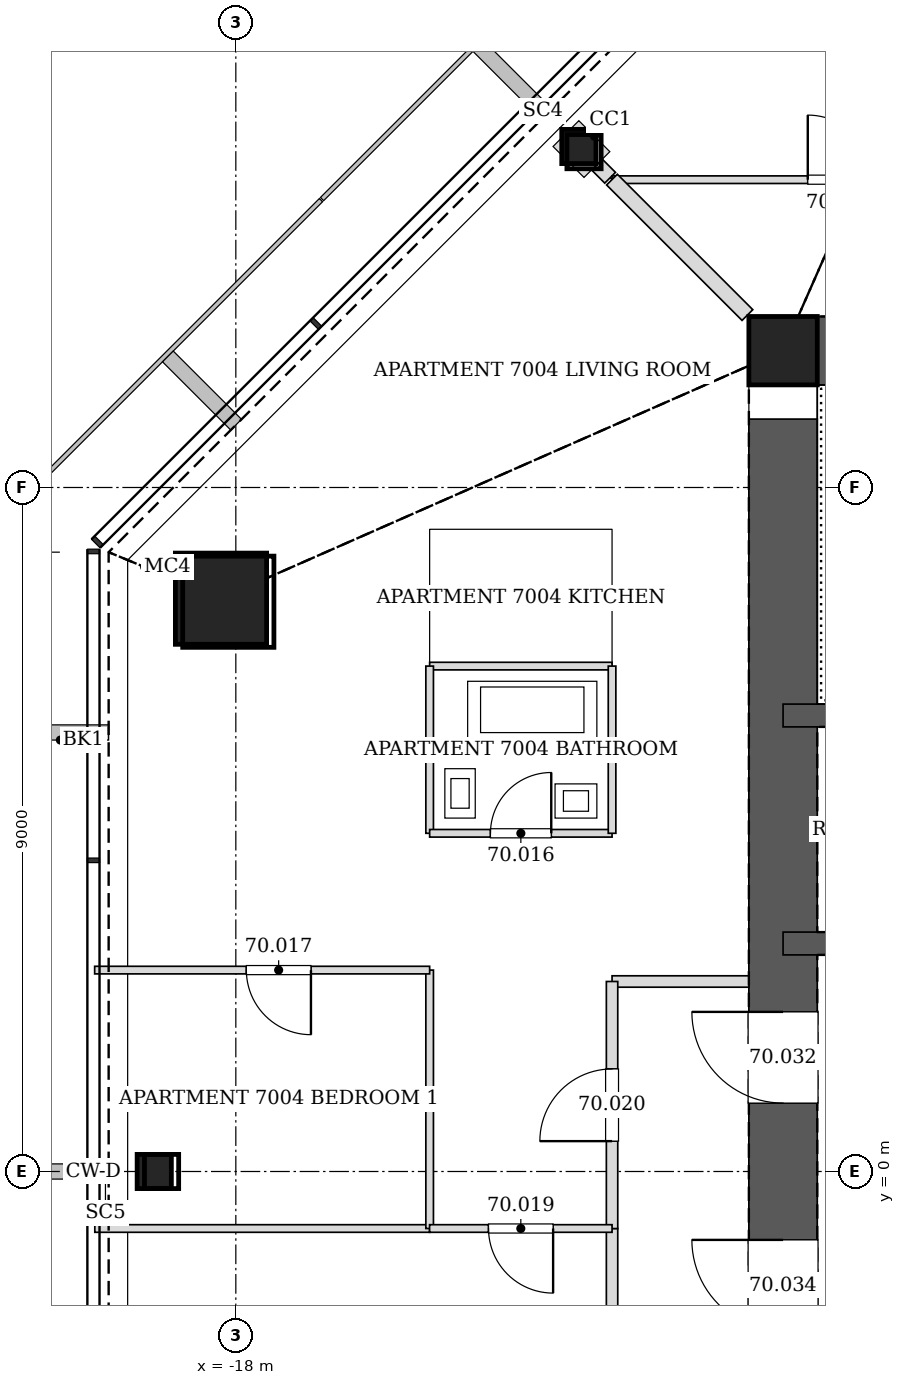
"""IFC4 building model, lengths in metres.
Left out: names, types, materials, properties, quantities, classifications, styles, units other than length and angle.
Written with IfcOpenShell. Run it as: python <this file> out.ifc"""

import sys

from ifc_helpers import new_model, si_unit, direction, frame, frame_2d, origin, origin_2d, place, context, subcontext, project, spatial, rectangle, hollow_rectangle, extrude, element, fill, save


model = new_model("IFC4")
c1 = context("Model", 3, precision=1e-05, world=origin(), true_north=direction((0.0, 1.0)))
c2 = subcontext(c1, "Body", "Model", "MODEL_VIEW")
j1 = project(units=[si_unit("LENGTHUNIT", "METRE"), si_unit("PLANEANGLEUNIT", "RADIAN")], contexts=[c1])
p1 = place(None, origin())
s1 = spatial("IfcSite", under=j1, at=p1, CompositionType="ELEMENT")
p2 = place(p1, origin())
s2 = spatial("IfcBuilding", under=s1, at=p2, CompositionType="ELEMENT")
p3 = place(p2, frame((0.0, 0.0, 287.8)))
s3 = spatial("IfcBuildingStorey", under=s2, at=p3, CompositionType="ELEMENT", Elevation=287.8)
p4 = place(p3, frame((-18.195, 7.537, 0.0), z_axis=(0.02827915051, -0.01169924247, 0.999531598986), x_axis=(0.382282742426, 0.924045401938, 0.0)))
e1 = element("IfcColumn", 1, at=p4, inside=s3, PredefinedType="COLUMN", context=c2, shape_type="SweptSolid", body=[
    extrude(hollow_rectangle(XDim=1.2, YDim=1.2, WallThickness=0.055, at=origin_2d()), origin(), (0.0, 0.0, 1.0), 3.402),
])
for number, where, z_axis, x_axis in (
    (2, (-13.487, 13.487, 0.0), (0.02, -0.02, 1.0), (0.707, 0.707, 0.0)),
    (3, (-19.073, 0.0, 0.0), (0.028, 0.0, 1.0), (0.0, 1.0, 0.0)),
):
    element("IfcColumn", number, at=place(p3, frame(where, z_axis=z_axis, x_axis=x_axis)), inside=s3, PredefinedType="COLUMN", context=c2, shape_type="SweptSolid", body=[
        extrude(hollow_rectangle(XDim=0.45, YDim=0.45, WallThickness=0.02, at=origin_2d()), origin(), (0.0, 0.0, 1.0), 3.401),
    ])
p5 = place(p3, frame((-10.8, 10.8, 0.0), z_axis=(0.0, 0.0, 1.0), x_axis=(1.0, 0.0, 0.0)))
e4 = element("IfcColumn", 4, at=p5, inside=s3, PredefinedType="COLUMN", context=c2, shape_type="SweptSolid", body=[
    extrude(hollow_rectangle(XDim=0.9, YDim=0.9, WallThickness=0.04, at=origin_2d()), origin(), (0.0, 0.0, 1.0), 3.4),
])
p6 = place(p3, frame((10.8, 10.8, 0.0), z_axis=(0.0, 0.0, 1.0), x_axis=(-1.0, 0.0, 0.0)))
e5 = element("IfcWall", 5, at=p6, inside=s3, PredefinedType="SOLIDWALL", context=c2, shape_type="SweptSolid", body=[
    extrude(rectangle(XDim=21.6, YDim=0.9, at=frame_2d((10.8, 0.0))), origin(), (0.0, 0.0, 1.0), 3.4),
])
p7 = place(p6, frame((10.05, 0.0, 0.0)))
e6 = element("IfcOpeningElement", 6, at=p7, cuts=e5, PredefinedType="OPENING", context=c2, shape_type="SweptSolid", body=[
    extrude(rectangle(XDim=1.5, YDim=2.1, at=frame_2d((0.75, 1.05))), frame((0.0, 0.46, 0.0), z_axis=(0.0, -1.0, 0.0), x_axis=(1.0, 0.0, 0.0)), (0.0, 0.0, 1.0), 0.92),
])
p8 = place(p3, frame((-10.8, 10.8, 0.0), z_axis=(0.0, 0.0, 1.0), x_axis=(0.0, -1.0, 0.0)))
e7 = element("IfcWall", 7, at=p8, inside=s3, PredefinedType="SOLIDWALL", context=c2, shape_type="SweptSolid", body=[
    extrude(rectangle(XDim=21.6, YDim=0.9, at=frame_2d((10.8, 0.0))), origin(), (0.0, 0.0, 1.0), 3.4),
])
p9 = place(p8, frame((8.7, 0.0, 0.0)))
e8 = element("IfcOpeningElement", 8, at=p9, cuts=e7, PredefinedType="OPENING", context=c2, shape_type="SweptSolid", body=[
    extrude(rectangle(XDim=1.2, YDim=2.1, at=frame_2d((0.6, 1.05))), frame((0.0, 0.46, 0.0), z_axis=(0.0, -1.0, 0.0), x_axis=(1.0, 0.0, 0.0)), (0.0, 0.0, 1.0), 0.92),
])
p10 = place(p8, frame((11.7, 0.0, 0.0)))
e9 = element("IfcOpeningElement", 9, at=p10, cuts=e7, PredefinedType="OPENING", context=c2, shape_type="SweptSolid", body=[
    extrude(rectangle(XDim=1.2, YDim=2.1, at=frame_2d((0.6, 1.05))), frame((0.0, 0.46, 0.0), z_axis=(0.0, -1.0, 0.0), x_axis=(1.0, 0.0, 0.0)), (0.0, 0.0, 1.0), 0.92),
])
p11 = place(p3, frame((-10.8, 3.0, 0.0), z_axis=(0.0, 0.0, 1.0), x_axis=(1.0, 0.0, 0.0)))
e10 = element("IfcWall", 10, at=p11, inside=s3, PredefinedType="SOLIDWALL", context=c2, shape_type="SweptSolid", body=[
    extrude(rectangle(XDim=21.6, YDim=0.3, at=frame_2d((10.8, 0.0))), origin(), (0.0, 0.0, 1.0), 3.4),
])
p12 = place(p11, frame((1.65, 0.0, 0.0)))
e11 = element("IfcOpeningElement", 11, at=p12, cuts=e10, PredefinedType="OPENING", context=c2, shape_type="SweptSolid", body=[
    extrude(rectangle(XDim=0.9, YDim=2.1, at=frame_2d((0.45, 1.05))), frame((0.0, 0.16, 0.0), z_axis=(0.0, -1.0, 0.0), x_axis=(1.0, 0.0, 0.0)), (0.0, 0.0, 1.0), 0.32),
])
p13 = place(p11, frame((7.45, 0.0, 0.0)))
e12 = element("IfcOpeningElement", 12, at=p13, cuts=e10, PredefinedType="OPENING", context=c2, shape_type="SweptSolid", body=[
    extrude(rectangle(XDim=0.9, YDim=2.1, at=frame_2d((0.45, 1.05))), frame((0.0, 0.16, 0.0), z_axis=(0.0, -1.0, 0.0), x_axis=(1.0, 0.0, 0.0)), (0.0, 0.0, 1.0), 0.32),
])
p14 = place(p11, frame((13.25, 0.0, 0.0)))
e13 = element("IfcOpeningElement", 13, at=p14, cuts=e10, PredefinedType="OPENING", context=c2, shape_type="SweptSolid", body=[
    extrude(rectangle(XDim=0.9, YDim=2.1, at=frame_2d((0.45, 1.05))), frame((0.0, 0.16, 0.0), z_axis=(0.0, -1.0, 0.0), x_axis=(1.0, 0.0, 0.0)), (0.0, 0.0, 1.0), 0.32),
])
p15 = place(p11, frame((16.15, 0.0, 0.0)))
e14 = element("IfcOpeningElement", 14, at=p15, cuts=e10, PredefinedType="OPENING", context=c2, shape_type="SweptSolid", body=[
    extrude(rectangle(XDim=0.9, YDim=2.1, at=frame_2d((0.45, 1.05))), frame((0.0, 0.16, 0.0), z_axis=(0.0, -1.0, 0.0), x_axis=(1.0, 0.0, 0.0)), (0.0, 0.0, 1.0), 0.32),
])
p16 = place(p11, frame((19.05, 0.0, 0.0)))
e15 = element("IfcOpeningElement", 15, at=p16, cuts=e10, PredefinedType="OPENING", context=c2, shape_type="SweptSolid", body=[
    extrude(rectangle(XDim=0.9, YDim=2.1, at=frame_2d((0.45, 1.05))), frame((0.0, 0.16, 0.0), z_axis=(0.0, -1.0, 0.0), x_axis=(1.0, 0.0, 0.0)), (0.0, 0.0, 1.0), 0.32),
])
p17 = place(p11, frame((4.55, 0.0, 0.0)))
e16 = element("IfcOpeningElement", 16, at=p17, cuts=e10, PredefinedType="OPENING", context=c2, shape_type="SweptSolid", body=[
    extrude(rectangle(XDim=0.9, YDim=2.1, at=frame_2d((0.45, 1.05))), frame((0.0, 0.16, 0.0), z_axis=(0.0, -1.0, 0.0), x_axis=(1.0, 0.0, 0.0)), (0.0, 0.0, 1.0), 0.32),
])
p18 = place(p3, frame((-10.8, 6.0, 0.0), z_axis=(0.0, 0.0, 1.0), x_axis=(1.0, 0.0, 0.0)))
e17 = element("IfcWall", 17, at=p18, inside=s3, PredefinedType="SOLIDWALL", context=c2, shape_type="SweptSolid", body=[
    extrude(rectangle(XDim=21.6, YDim=0.3, at=frame_2d((10.8, 0.0))), origin(), (0.0, 0.0, 1.0), 3.4),
])
p19 = place(p18, frame((10.25, 0.0, 0.0)))
e18 = element("IfcOpeningElement", 18, at=p19, cuts=e17, PredefinedType="OPENING", context=c2, shape_type="SweptSolid", body=[
    extrude(rectangle(XDim=1.1, YDim=2.1, at=frame_2d((0.55, 1.05))), frame((0.0, 0.16, 0.0), z_axis=(0.0, -1.0, 0.0), x_axis=(1.0, 0.0, 0.0)), (0.0, 0.0, 1.0), 0.32),
])
p20 = place(p3, frame((-13.05, -0.749, 0.0), z_axis=(0.0, 0.0, 1.0), x_axis=(0.0, -1.0, 0.0)))
e19 = element("IfcWall", 19, at=p20, inside=s3, PredefinedType="PARTITIONING", context=c2, shape_type="SweptSolid", body=[
    extrude(rectangle(XDim=1.502, YDim=0.15, at=frame_2d((0.751, 0.0))), origin(), (0.0, 0.0, 1.0), 3.2),
])
p21 = place(p3, frame((-11.25, 2.5, 0.0), z_axis=(0.0, 0.0, 1.0), x_axis=(-1.0, 0.0, 0.0)))
e20 = element("IfcWall", 20, at=p21, inside=s3, PredefinedType="PARTITIONING", context=c2, shape_type="SweptSolid", body=[
    extrude(rectangle(XDim=1.8, YDim=0.15, at=frame_2d((0.9, 0.0))), origin(), (0.0, 0.0, 1.0), 3.2),
])
p22 = place(p3, frame((-13.05, 2.5, 0.0), z_axis=(0.0, 0.0, 1.0), x_axis=(0.0, -1.0, 0.0)))
e21 = element("IfcWall", 21, at=p22, inside=s3, PredefinedType="PARTITIONING", context=c2, shape_type="SweptSolid", body=[
    extrude(rectangle(XDim=3.251, YDim=0.15, at=frame_2d((1.625, 0.0))), origin(), (0.0, 0.0, 1.0), 2.349),
])
p23 = place(p22, frame((1.15, 0.0, 0.0)))
e22 = element("IfcOpeningElement", 22, at=p23, cuts=e21, PredefinedType="OPENING", context=c2, shape_type="SweptSolid", body=[
    extrude(rectangle(XDim=0.95, YDim=2.1, at=frame_2d((0.475, 1.05))), frame((0.0, 0.085, 0.0), z_axis=(0.0, -1.0, 0.0), x_axis=(1.0, 0.0, 0.0)), (0.0, 0.0, 1.0), 0.17),
])
p24 = place(p3, frame((-13.246, 13.246, 0.0), z_axis=(0.0, 0.0, 1.0), x_axis=(0.707106781187, -0.707106781187, 0.0)))
e23 = element("IfcWall", 23, at=p24, inside=s3, PredefinedType="PARTITIONING", context=c2, shape_type="SweptSolid", body=[
    extrude(rectangle(XDim=0.241, YDim=0.2, at=frame_2d((0.121, 0.0))), origin(), (0.0, 0.0, 1.0), 2.591),
])
p25 = place(p3, frame((-13.05, 13.05, 0.0), z_axis=(0.0, 0.0, 1.0), x_axis=(1.0, 0.0, 0.0)))
e24 = element("IfcWall", 24, at=p25, inside=s3, PredefinedType="PARTITIONING", context=c2, shape_type="SweptSolid", body=[
    extrude(rectangle(XDim=6.0, YDim=0.1, at=frame_2d((3.0, 0.0))), origin(), (0.0, 0.0, 1.0), 2.497),
])
p26 = place(p25, frame((2.575, 0.0, 0.0)))
e25 = element("IfcOpeningElement", 25, at=p26, cuts=e24, PredefinedType="OPENING", context=c2, shape_type="SweptSolid", body=[
    extrude(rectangle(XDim=0.85, YDim=2.1, at=frame_2d((0.425, 1.05))), frame((0.0, 0.06, 0.0), z_axis=(0.0, -1.0, 0.0), x_axis=(1.0, 0.0, 0.0)), (0.0, 0.0, 1.0), 0.12),
])
p27 = place(p3, frame((-15.45, 6.65, 0.0), z_axis=(0.0, 0.0, 1.0), x_axis=(1.0, 0.0, 0.0)))
e26 = element("IfcWall", 26, at=p27, inside=s3, PredefinedType="PARTITIONING", context=c2, shape_type="SweptSolid", body=[
    extrude(rectangle(XDim=2.4, YDim=0.1, at=frame_2d((1.2, 0.0))), origin(), (0.0, 0.0, 1.0), 2.591),
])
p28 = place(p3, frame((-15.45, 6.65, 0.0), z_axis=(0.0, 0.0, 1.0), x_axis=(0.0, -1.0, 0.0)))
e27 = element("IfcWall", 27, at=p28, inside=s3, PredefinedType="PARTITIONING", context=c2, shape_type="SweptSolid", body=[
    extrude(rectangle(XDim=2.2, YDim=0.1, at=frame_2d((1.1, 0.0))), origin(), (0.0, 0.0, 1.0), 3.2),
])
p29 = place(p3, frame((-15.45, 4.45, 0.0), z_axis=(0.0, 0.0, 1.0), x_axis=(1.0, 0.0, 0.0)))
e28 = element("IfcWall", 28, at=p29, inside=s3, PredefinedType="PARTITIONING", context=c2, shape_type="SweptSolid", body=[
    extrude(rectangle(XDim=2.4, YDim=0.1, at=frame_2d((1.2, 0.0))), origin(), (0.0, 0.0, 1.0), 2.591),
])
p30 = place(p29, frame((0.8, 0.0, 0.0)))
e29 = element("IfcOpeningElement", 29, at=p30, cuts=e28, PredefinedType="OPENING", context=c2, shape_type="SweptSolid", body=[
    extrude(rectangle(XDim=0.8, YDim=2.1, at=frame_2d((0.4, 1.05))), frame((0.0, 0.06, 0.0), z_axis=(0.0, -1.0, 0.0), x_axis=(1.0, 0.0, 0.0)), (0.0, 0.0, 1.0), 0.12),
])
p31 = place(p3, frame((-13.05, 4.45, 0.0), z_axis=(0.0, 0.0, 1.0), x_axis=(0.0, 1.0, 0.0)))
e30 = element("IfcWall", 30, at=p31, inside=s3, PredefinedType="PARTITIONING", context=c2, shape_type="SweptSolid", body=[
    extrude(rectangle(XDim=2.2, YDim=0.1, at=frame_2d((1.1, 0.0))), origin(), (0.0, 0.0, 1.0), 3.2),
])
p32 = place(p3, frame((-19.855, -0.75, 0.0), z_axis=(0.0, 0.0, 1.0), x_axis=(1.0, 0.0, 0.0)))
e31 = element("IfcWall", 31, at=p32, inside=s3, PredefinedType="PARTITIONING", context=c2, shape_type="SweptSolid", body=[
    extrude(rectangle(XDim=4.405, YDim=0.1, at=frame_2d((2.203, 0.0))), origin(), (0.0, 0.0, 1.0), 2.73),
])
p33 = place(p3, frame((-15.45, -0.75, 0.0), z_axis=(0.0, 0.0, 1.0), x_axis=(0.0, 1.0, 0.0)))
e32 = element("IfcWall", 32, at=p33, inside=s3, PredefinedType="PARTITIONING", context=c2, shape_type="SweptSolid", body=[
    extrude(rectangle(XDim=3.4, YDim=0.1, at=frame_2d((1.7, 0.0))), origin(), (0.0, 0.0, 1.0), 2.349),
])
p34 = place(p3, frame((-15.45, 2.65, 0.0), z_axis=(0.0, 0.0, 1.0), x_axis=(-1.0, 0.0, 0.0)))
e33 = element("IfcWall", 33, at=p34, inside=s3, PredefinedType="PARTITIONING", context=c2, shape_type="SweptSolid", body=[
    extrude(rectangle(XDim=4.407, YDim=0.1, at=frame_2d((2.204, 0.0))), origin(), (0.0, 0.0, 1.0), 2.73),
])
p35 = place(p34, frame((1.562, 0.0, 0.0)))
e34 = element("IfcOpeningElement", 34, at=p35, cuts=e33, PredefinedType="OPENING", context=c2, shape_type="SweptSolid", body=[
    extrude(rectangle(XDim=0.85, YDim=2.1, at=frame_2d((0.425, 1.05))), frame((0.0, 0.06, 0.0), z_axis=(0.0, -1.0, 0.0), x_axis=(1.0, 0.0, 0.0)), (0.0, 0.0, 1.0), 0.12),
])
p36 = place(p3, frame((-13.05, -0.75, 0.0), z_axis=(0.0, 0.0, 1.0), x_axis=(-1.0, 0.0, 0.0)))
e35 = element("IfcWall", 35, at=p36, inside=s3, PredefinedType="PARTITIONING", context=c2, shape_type="SweptSolid", body=[
    extrude(rectangle(XDim=2.401, YDim=0.1, at=frame_2d((1.2, 0.0))), origin(), (0.0, 0.0, 1.0), 2.591),
])
p37 = place(p36, frame((0.775, 0.0, 0.0)))
e36 = element("IfcOpeningElement", 36, at=p37, cuts=e35, PredefinedType="OPENING", context=c2, shape_type="SweptSolid", body=[
    extrude(rectangle(XDim=0.85, YDim=2.1, at=frame_2d((0.425, 1.05))), frame((0.0, 0.06, 0.0), z_axis=(0.0, -1.0, 0.0), x_axis=(1.0, 0.0, 0.0)), (0.0, 0.0, 1.0), 0.12),
])
p38 = place(p3, frame((-11.269, 11.269, 0.0), z_axis=(0.0, 0.0, 1.0), x_axis=(-0.707106781187, 0.707106781187, 0.0)))
e37 = element("IfcWall", 37, at=p38, inside=s3, PredefinedType="PARTITIONING", context=c2, shape_type="SweptSolid", body=[
    extrude(rectangle(XDim=2.52, YDim=0.2, at=frame_2d((1.26, 0.0))), origin(), (0.0, 0.0, 1.0), 2.591),
])
p39 = place(p26, origin())
e38 = element("IfcDoor", 38, at=p39, inside=s3, OperationType="SINGLE_SWING_LEFT", PredefinedType="DOOR", context=c2, shape_type="SweptSolid", body=[
    extrude(rectangle(XDim=0.85, YDim=2.1, at=frame_2d((0.425, 1.05))), frame((0.0, 0.025, 0.0), z_axis=(0.0, -1.0, 0.0), x_axis=(1.0, 0.0, 0.0)), (0.0, 0.0, 1.0), 0.05),
])
fill(e25, e38)
p40 = place(p30, origin())
e39 = element("IfcDoor", 39, at=p40, inside=s3, OperationType="SINGLE_SWING_RIGHT", PredefinedType="DOOR", context=c2, shape_type="SweptSolid", body=[
    extrude(rectangle(XDim=0.8, YDim=2.1, at=frame_2d((0.4, 1.05))), frame((0.0, 0.025, 0.0), z_axis=(0.0, -1.0, 0.0), x_axis=(1.0, 0.0, 0.0)), (0.0, 0.0, 1.0), 0.05),
])
fill(e29, e39)
p41 = place(p35, origin())
e40 = element("IfcDoor", 40, at=p41, inside=s3, OperationType="SINGLE_SWING_LEFT", PredefinedType="DOOR", context=c2, shape_type="SweptSolid", body=[
    extrude(rectangle(XDim=0.85, YDim=2.1, at=frame_2d((0.425, 1.05))), frame((0.0, 0.025, 0.0), z_axis=(0.0, -1.0, 0.0), x_axis=(1.0, 0.0, 0.0)), (0.0, 0.0, 1.0), 0.05),
])
fill(e34, e40)
p42 = place(p37, origin())
e41 = element("IfcDoor", 41, at=p42, inside=s3, OperationType="SINGLE_SWING_LEFT", PredefinedType="DOOR", context=c2, shape_type="SweptSolid", body=[
    extrude(rectangle(XDim=0.85, YDim=2.1, at=frame_2d((0.425, 1.05))), frame((0.0, 0.025, 0.0), z_axis=(0.0, -1.0, 0.0), x_axis=(1.0, 0.0, 0.0)), (0.0, 0.0, 1.0), 0.05),
])
fill(e36, e41)
p43 = place(p23, frame((0.95, 0.0, 0.0), z_axis=(0.0, 0.0, 1.0), x_axis=(-1.0, 0.0, 0.0)))
e42 = element("IfcDoor", 42, at=p43, inside=s3, OperationType="SINGLE_SWING_LEFT", PredefinedType="DOOR", context=c2, shape_type="SweptSolid", body=[
    extrude(rectangle(XDim=0.95, YDim=2.1, at=frame_2d((0.475, 1.05))), frame((0.0, 0.025, 0.0), z_axis=(0.0, -1.0, 0.0), x_axis=(1.0, 0.0, 0.0)), (0.0, 0.0, 1.0), 0.05),
])
fill(e22, e42)
p44 = place(p9, frame((1.2, 0.0, 0.0), z_axis=(0.0, 0.0, 1.0), x_axis=(-1.0, 0.0, 0.0)))
e43 = element("IfcDoor", 43, at=p44, inside=s3, OperationType="SINGLE_SWING_RIGHT", PredefinedType="DOOR", context=c2, shape_type="SweptSolid", body=[
    extrude(rectangle(XDim=1.2, YDim=2.1, at=frame_2d((0.6, 1.05))), frame((0.0, 0.025, 0.0), z_axis=(0.0, -1.0, 0.0), x_axis=(1.0, 0.0, 0.0)), (0.0, 0.0, 1.0), 0.05),
])
fill(e8, e43)
p45 = place(p10, frame((1.2, 0.0, 0.0), z_axis=(0.0, 0.0, 1.0), x_axis=(-1.0, 0.0, 0.0)))
e44 = element("IfcDoor", 44, at=p45, inside=s3, OperationType="SINGLE_SWING_RIGHT", PredefinedType="DOOR", context=c2, shape_type="SweptSolid", body=[
    extrude(rectangle(XDim=1.2, YDim=2.1, at=frame_2d((0.6, 1.05))), frame((0.0, 0.025, 0.0), z_axis=(0.0, -1.0, 0.0), x_axis=(1.0, 0.0, 0.0)), (0.0, 0.0, 1.0), 0.05),
])
fill(e9, e44)
save(model, sys.argv[1])
